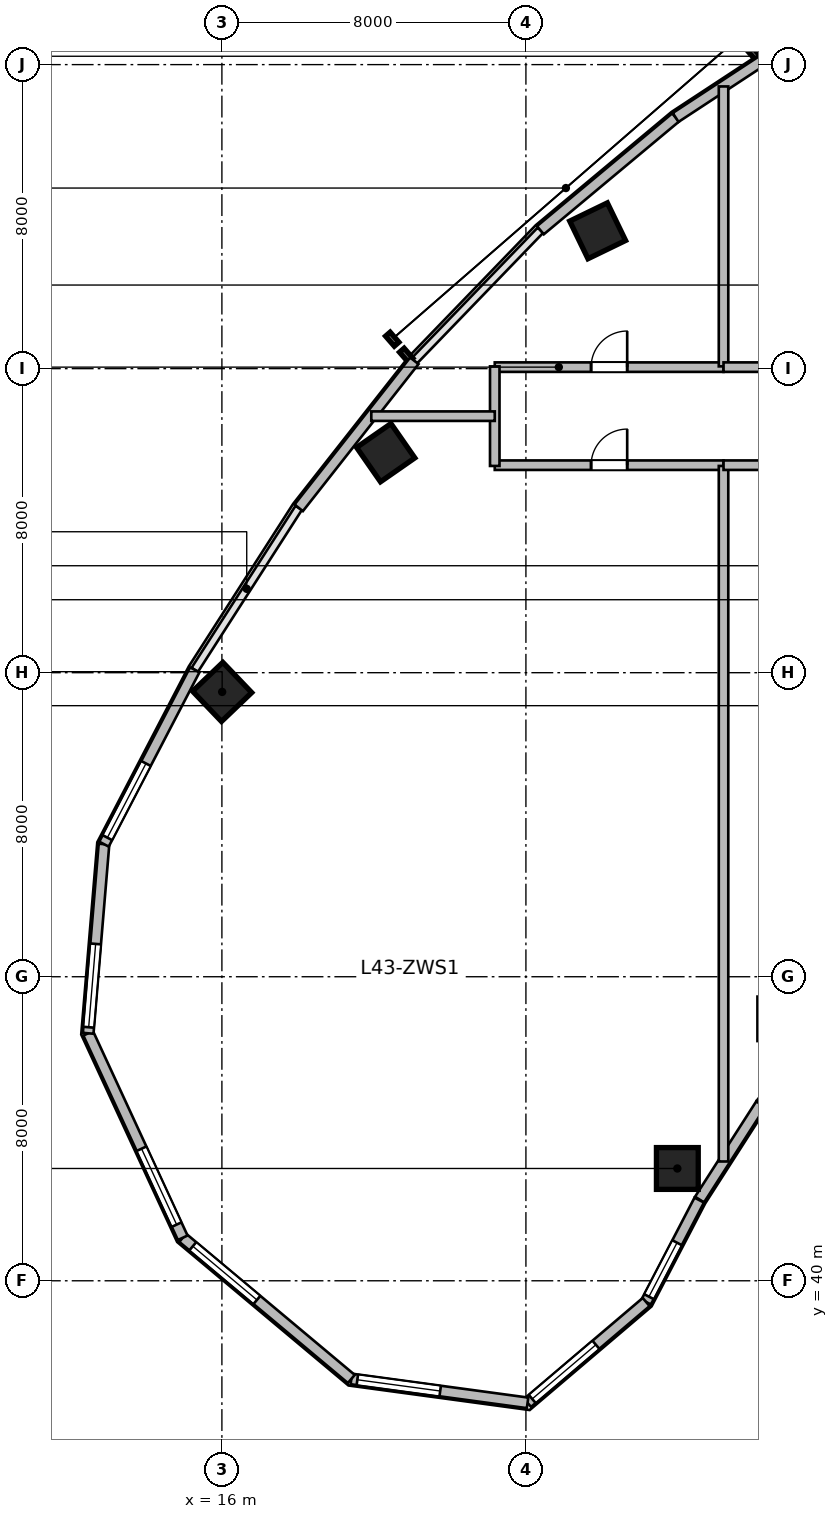
"""IFC4 building model, lengths in metres.
Left out: names, types, materials, properties, quantities, classifications, styles, units other than length and angle.
Written with IfcOpenShell. Run it as: python <this file> out.ifc"""

import sys

from ifc_helpers import new_model, si_unit, direction, frame, frame_2d, origin, origin_2d, place, context, subcontext, project, spatial, rectangle, circle, extrude, source, transform, mapped, element, fill, save


model = new_model("IFC4")
c1 = context("Model", 3, precision=1e-05, world=origin(), true_north=direction((0.0, 1.0)))
c2 = subcontext(c1, "Body", "Model", "MODEL_VIEW")
j1 = project(units=[si_unit("LENGTHUNIT", "METRE"), si_unit("PLANEANGLEUNIT", "RADIAN")], contexts=[c1])
p1 = place(None, origin())
s1 = spatial("IfcSite", under=j1, at=p1, CompositionType="ELEMENT")
p2 = place(p1, origin())
s2 = spatial("IfcBuilding", under=s1, at=p2, CompositionType="ELEMENT")
p3 = place(p2, frame((0.0, 0.0, 177.9)))
s3 = spatial("IfcBuildingStorey", under=s2, at=p3, CompositionType="ELEMENT", Elevation=177.9)
m1 = source(origin(), c2, "Body", "SweptSolid", [
    extrude(circle(Radius=0.55, at=origin_2d()), origin(), (0.0, 0.0, 1.0), 3.9),
])
p4 = place(p3, frame((27.985, 42.955, 0.0), z_axis=(0.0, 0.0, 1.0), x_axis=(-0.690756218984, 0.723087716626, 0.0)))
e1 = element("IfcColumn", 1, at=p4, inside=s3, PredefinedType="COLUMN", context=c2, shape_type="MappedRepresentation", body=[
    mapped(m1, transform((0.0, 0.0, 0.0), scale=1.0)),
])
m2 = source(origin(), c2, "Body", "SweptSolid", [
    extrude(rectangle(XDim=1.1, YDim=1.1, at=origin_2d()), origin(), (0.0, 0.0, 1.0), 3.9),
])
for number, where, z_axis, x_axis in (
    (2, (16.007, 55.494, 0.0), (0.0, 0.0, 1.0), (-0.691, 0.723, 0.0)),
    (3, (20.311, 61.789, 0.0), (0.0, 0.0, 1.0), (-0.571, 0.821, 0.0)),
    (4, (25.888, 67.627, 0.0), (0.0, 0.0, 1.0), (-0.436, 0.9, 0.0)),
):
    element("IfcColumn", number, at=place(p3, frame(where, z_axis=z_axis, x_axis=x_axis)), inside=s3, PredefinedType="COLUMN", context=c2, shape_type="MappedRepresentation", body=[
        mapped(m2, transform((0.0, 0.0, 0.0), scale=1.0)),
    ])
m3 = source(origin(), c2, "Body", "SweptSolid", [
    extrude(rectangle(XDim=2.897, YDim=0.28, at=frame_2d((1.448, 0.0))), origin(), (0.0, 0.0, 1.0), 3.65),
])
p5 = place(p3, frame((31.979, 46.936, 0.0), z_axis=(0.0, 0.0, 1.0), x_axis=(-0.618167636915, -0.786046291685, 0.0)))
e5 = element("IfcWall", 5, at=p5, inside=s3, PredefinedType="SOLIDWALL", context=c2, shape_type="MappedRepresentation", body=[
    mapped(m3, transform((0.0, 0.0, 0.0), scale=1.0)),
])
m4 = source(origin(), c2, "Body", "SweptSolid", [
    extrude(rectangle(XDim=2.981, YDim=0.28, at=frame_2d((1.49, 0.0))), origin(), (0.0, 0.0, 1.0), 3.65),
])
p6 = place(p3, frame((30.179, 44.645, 0.0), z_axis=(0.0, 0.0, 1.0), x_axis=(-0.540194451908, -0.841540227278, 0.0)))
e6 = element("IfcWall", 6, at=p6, inside=s3, PredefinedType="SOLIDWALL", context=c2, shape_type="MappedRepresentation", body=[
    mapped(m4, transform((0.0, 0.0, 0.0), scale=1.0)),
])
m5 = source(origin(), c2, "Body", "SweptSolid", [
    extrude(rectangle(XDim=3.024, YDim=0.28, at=frame_2d((1.512, 0.0))), origin(), (0.0, 0.0, 1.0), 3.65),
])
p7 = place(p3, frame((28.561, 42.123, 0.0), z_axis=(0.0, 0.0, 1.0), x_axis=(-0.461718746531, -0.887026380161, 0.0)))
e7 = element("IfcWall", 7, at=p7, inside=s3, PredefinedType="SOLIDWALL", context=c2, shape_type="MappedRepresentation", body=[
    mapped(m5, transform((0.0, 0.0, 0.0), scale=1.0)),
])
p8 = place(p7, frame((1.264, 0.0, 0.95)))
e8 = element("IfcOpeningElement", 8, at=p8, cuts=e7, PredefinedType="OPENING", context=c2, shape_type="SweptSolid", body=[
    extrude(rectangle(XDim=1.6, YDim=1.9, at=frame_2d((0.8, 0.95))), frame((0.0, 0.15, 0.0), z_axis=(0.0, -1.0, 0.0), x_axis=(1.0, 0.0, 0.0)), (0.0, 0.0, 1.0), 0.3),
])
m6 = source(origin(), c2, "Body", "SweptSolid", [
    extrude(rectangle(XDim=4.096, YDim=0.28, at=frame_2d((2.048, 0.0))), origin(), (0.0, 0.0, 1.0), 3.65),
])
p9 = place(p3, frame((27.164, 39.44, 0.0), z_axis=(0.0, 0.0, 1.0), x_axis=(-0.761926081737, -0.647663991564, 0.0)))
e9 = element("IfcWall", 9, at=p9, inside=s3, PredefinedType="SOLIDWALL", context=c2, shape_type="MappedRepresentation", body=[
    mapped(m6, transform((0.0, 0.0, 0.0), scale=1.0)),
])
p10 = place(p9, frame((1.736, 0.0, 0.95)))
e10 = element("IfcOpeningElement", 10, at=p10, cuts=e9, PredefinedType="OPENING", context=c2, shape_type="SweptSolid", body=[
    extrude(rectangle(XDim=2.2, YDim=2.1, at=frame_2d((1.1, 1.05))), frame((0.0, 0.15, 0.0), z_axis=(0.0, -1.0, 0.0), x_axis=(1.0, 0.0, 0.0)), (0.0, 0.0, 1.0), 0.3),
])
m7 = source(origin(), c2, "Body", "SweptSolid", [
    extrude(rectangle(XDim=4.68, YDim=0.28, at=frame_2d((2.34, 0.0))), origin(), (0.0, 0.0, 1.0), 3.65),
])
p11 = place(p3, frame((24.043, 36.788, 0.0), z_axis=(0.0, 0.0, 1.0), x_axis=(-0.990931146435, 0.134370618162, 0.0)))
e11 = element("IfcWall", 11, at=p11, inside=s3, PredefinedType="SOLIDWALL", context=c2, shape_type="MappedRepresentation", body=[
    mapped(m7, transform((0.0, 0.0, 0.0), scale=1.0)),
])
p12 = place(p11, frame((2.32, 0.0, 0.95)))
e12 = element("IfcOpeningElement", 12, at=p12, cuts=e11, PredefinedType="OPENING", context=c2, shape_type="SweptSolid", body=[
    extrude(rectangle(XDim=2.2, YDim=2.1, at=frame_2d((1.1, 1.05))), frame((0.0, 0.15, 0.0), z_axis=(0.0, -1.0, 0.0), x_axis=(1.0, 0.0, 0.0)), (0.0, 0.0, 1.0), 0.3),
])
m8 = source(origin(), c2, "Body", "SweptSolid", [
    extrude(rectangle(XDim=5.786, YDim=0.28, at=frame_2d((2.893, 0.0))), origin(), (0.0, 0.0, 1.0), 3.65),
])
p13 = place(p3, frame((19.406, 37.417, 0.0), z_axis=(0.0, 0.0, 1.0), x_axis=(-0.766711306852, 0.641992034176, 0.0)))
e13 = element("IfcWall", 13, at=p13, inside=s3, PredefinedType="SOLIDWALL", context=c2, shape_type="MappedRepresentation", body=[
    mapped(m8, transform((0.0, 0.0, 0.0), scale=1.0)),
])
p14 = place(p13, frame((3.24, 0.0, 0.95)))
e14 = element("IfcOpeningElement", 14, at=p14, cuts=e13, PredefinedType="OPENING", context=c2, shape_type="SweptSolid", body=[
    extrude(rectangle(XDim=2.2, YDim=2.1, at=frame_2d((1.1, 1.05))), frame((0.0, 0.15, 0.0), z_axis=(0.0, -1.0, 0.0), x_axis=(1.0, 0.0, 0.0)), (0.0, 0.0, 1.0), 0.3),
])
m9 = source(origin(), c2, "Body", "SweptSolid", [
    extrude(rectangle(XDim=5.927, YDim=0.28, at=frame_2d((2.964, 0.0))), origin(), (0.0, 0.0, 1.0), 3.65),
])
p15 = place(p3, frame((14.969, 41.131, 0.0), z_axis=(0.0, 0.0, 1.0), x_axis=(-0.419656204795, 0.907683132914, 0.0)))
e15 = element("IfcWall", 15, at=p15, inside=s3, PredefinedType="SOLIDWALL", context=c2, shape_type="MappedRepresentation", body=[
    mapped(m9, transform((0.0, 0.0, 0.0), scale=1.0)),
])
p16 = place(p15, frame((0.382, 0.0, 0.95)))
e16 = element("IfcOpeningElement", 16, at=p16, cuts=e15, PredefinedType="OPENING", context=c2, shape_type="SweptSolid", body=[
    extrude(rectangle(XDim=2.2, YDim=2.1, at=frame_2d((1.1, 1.05))), frame((0.0, 0.15, 0.0), z_axis=(0.0, -1.0, 0.0), x_axis=(1.0, 0.0, 0.0)), (0.0, 0.0, 1.0), 0.3),
])
m10 = source(origin(), c2, "Body", "SweptSolid", [
    extrude(rectangle(XDim=4.994, YDim=0.28, at=frame_2d((2.497, 0.0))), origin(), (0.0, 0.0, 1.0), 3.65),
])
p17 = place(p3, frame((12.481, 46.512, 0.0), z_axis=(0.0, 0.0, 1.0), x_axis=(0.083344839916, 0.996520766296, 0.0)))
e17 = element("IfcWall", 17, at=p17, inside=s3, PredefinedType="SOLIDWALL", context=c2, shape_type="MappedRepresentation", body=[
    mapped(m10, transform((0.0, 0.0, 0.0), scale=1.0)),
])
p18 = place(p17, frame((0.16, 0.0, 0.95)))
e18 = element("IfcOpeningElement", 18, at=p18, cuts=e17, PredefinedType="OPENING", context=c2, shape_type="SweptSolid", body=[
    extrude(rectangle(XDim=2.2, YDim=2.1, at=frame_2d((1.1, 1.05))), frame((0.0, 0.15, 0.0), z_axis=(0.0, -1.0, 0.0), x_axis=(1.0, 0.0, 0.0)), (0.0, 0.0, 1.0), 0.3),
])
m11 = source(origin(), c2, "Body", "SweptSolid", [
    extrude(rectangle(XDim=5.171, YDim=0.28, at=frame_2d((2.585, 0.0))), origin(), (0.0, 0.0, 1.0), 3.65),
])
p19 = place(p3, frame((12.898, 51.489, 0.0), z_axis=(0.0, 0.0, 1.0), x_axis=(0.461752581363, 0.887008767491, 0.0)))
e19 = element("IfcWall", 19, at=p19, inside=s3, PredefinedType="SOLIDWALL", context=c2, shape_type="MappedRepresentation", body=[
    mapped(m11, transform((0.0, 0.0, 0.0), scale=1.0)),
])
p20 = place(p19, frame((0.193, 0.0, 0.95)))
e20 = element("IfcOpeningElement", 20, at=p20, cuts=e19, PredefinedType="OPENING", context=c2, shape_type="SweptSolid", body=[
    extrude(rectangle(XDim=2.2, YDim=2.1, at=frame_2d((1.1, 1.05))), frame((0.0, 0.15, 0.0), z_axis=(0.0, -1.0, 0.0), x_axis=(1.0, 0.0, 0.0)), (0.0, 0.0, 1.0), 0.3),
])
m12 = source(origin(), c2, "Body", "SweptSolid", [
    extrude(rectangle(XDim=4.922, YDim=0.28, at=frame_2d((2.461, 0.0))), origin(), (0.0, 0.0, 1.0), 3.65),
])
p21 = place(p3, frame((18.021, 60.338, 0.0), z_axis=(0.0, 0.0, 1.0), x_axis=(0.61817639101, 0.786039407153, 0.0)))
e21 = element("IfcWall", 21, at=p21, inside=s3, PredefinedType="SOLIDWALL", context=c2, shape_type="MappedRepresentation", body=[
    mapped(m12, transform((0.0, 0.0, 0.0), scale=1.0)),
])
m13 = source(origin(), c2, "Body", "SweptSolid", [
    extrude(rectangle(XDim=4.634, YDim=0.28, at=frame_2d((2.317, 0.0))), origin(), (0.0, 0.0, 1.0), 3.65),
])
p22 = place(p3, frame((24.381, 67.642, 0.0), z_axis=(0.0, 0.0, 1.0), x_axis=(0.767910229096, 0.640557475993, 0.0)))
e22 = element("IfcWall", 22, at=p22, inside=s3, PredefinedType="SOLIDWALL", context=c2, shape_type="MappedRepresentation", body=[
    mapped(m13, transform((0.0, 0.0, 0.0), scale=1.0)),
])
m14 = source(origin(), c2, "Body", "SweptSolid", [
    extrude(rectangle(XDim=4.501, YDim=0.28, at=frame_2d((2.25, 0.0))), origin(), (0.0, 0.0, 1.0), 3.65),
])
p23 = place(p3, frame((27.939, 70.61, 0.0), z_axis=(0.0, 0.0, 1.0), x_axis=(0.835984920737, 0.548752414391, 0.0)))
e23 = element("IfcWall", 23, at=p23, inside=s3, PredefinedType="SOLIDWALL", context=c2, shape_type="MappedRepresentation", body=[
    mapped(m14, transform((0.0, 0.0, 0.0), scale=1.0)),
])
m15 = source(origin(), c2, "Body", "SweptSolid", [
    extrude(rectangle(XDim=6.02, YDim=0.25, at=frame_2d((3.01, 0.0))), origin(), (0.0, 0.0, 1.0), 3.65),
])
p24 = place(p3, frame((23.18, 64.04, 0.0), z_axis=(0.0, 0.0, 1.0), x_axis=(1.0, 0.0, 0.0)))
e24 = element("IfcWall", 24, at=p24, inside=s3, PredefinedType="PARTITIONING", context=c2, shape_type="MappedRepresentation", body=[
    mapped(m15, transform((0.0, 0.0, 0.0), scale=1.0)),
])
p25 = place(p24, frame((2.535, 0.0, 0.0)))
e25 = element("IfcOpeningElement", 25, at=p25, cuts=e24, PredefinedType="OPENING", context=c2, shape_type="SweptSolid", body=[
    extrude(rectangle(XDim=0.95, YDim=2.1, at=frame_2d((0.475, 1.05))), frame((0.0, 0.135, 0.0), z_axis=(0.0, -1.0, 0.0), x_axis=(1.0, 0.0, 0.0)), (0.0, 0.0, 1.0), 0.27),
])
m16 = source(origin(), c2, "Body", "SweptSolid", [
    extrude(rectangle(XDim=7.365, YDim=0.25, at=frame_2d((3.683, 0.0))), origin(), (0.0, 0.0, 1.0), 3.65),
])
p26 = place(p3, frame((29.2, 64.06, 0.0), z_axis=(0.0, 0.0, 1.0), x_axis=(0.0, 1.0, 0.0)))
e26 = element("IfcWall", 26, at=p26, inside=s3, PredefinedType="PARTITIONING", context=c2, shape_type="MappedRepresentation", body=[
    mapped(m16, transform((0.0, 0.0, 0.0), scale=1.0)),
])
m17 = source(origin(), c2, "Body", "SweptSolid", [
    extrude(rectangle(XDim=5.2, YDim=0.25, at=frame_2d((2.6, 0.0))), origin(), (0.0, 0.0, 1.0), 3.65),
])
p27 = place(p3, frame((29.2, 64.04, 0.0), z_axis=(0.0, 0.0, 1.0), x_axis=(1.0, 0.0, 0.0)))
e27 = element("IfcWall", 27, at=p27, inside=s3, PredefinedType="PARTITIONING", context=c2, shape_type="MappedRepresentation", body=[
    mapped(m17, transform((0.0, 0.0, 0.0), scale=1.0)),
])
p28 = place(p27, frame((2.125, 0.0, 0.0)))
e28 = element("IfcOpeningElement", 28, at=p28, cuts=e27, PredefinedType="OPENING", context=c2, shape_type="SweptSolid", body=[
    extrude(rectangle(XDim=0.95, YDim=2.1, at=frame_2d((0.475, 1.05))), frame((0.0, 0.135, 0.0), z_axis=(0.0, -1.0, 0.0), x_axis=(1.0, 0.0, 0.0)), (0.0, 0.0, 1.0), 0.27),
])
p29 = place(p3, frame((23.18, 61.46, 0.0), z_axis=(0.0, 0.0, 1.0), x_axis=(1.0, 0.0, 0.0)))
e29 = element("IfcWall", 29, at=p29, inside=s3, PredefinedType="PARTITIONING", context=c2, shape_type="MappedRepresentation", body=[
    mapped(m15, transform((0.0, 0.0, 0.0), scale=1.0)),
])
p30 = place(p29, frame((2.535, 0.0, 0.0)))
e30 = element("IfcOpeningElement", 30, at=p30, cuts=e29, PredefinedType="OPENING", context=c2, shape_type="SweptSolid", body=[
    extrude(rectangle(XDim=0.95, YDim=2.1, at=frame_2d((0.475, 1.05))), frame((0.0, 0.135, 0.0), z_axis=(0.0, -1.0, 0.0), x_axis=(1.0, 0.0, 0.0)), (0.0, 0.0, 1.0), 0.27),
])
m18 = source(origin(), c2, "Body", "SweptSolid", [
    extrude(rectangle(XDim=18.301, YDim=0.25, at=frame_2d((9.15, 0.0))), origin(), (0.0, 0.0, 1.0), 2.942),
])
p31 = place(p3, frame((29.2, 43.139, 0.0), z_axis=(0.0, 0.0, 1.0), x_axis=(0.0, 1.0, 0.0)))
e31 = element("IfcWall", 31, at=p31, inside=s3, PredefinedType="PARTITIONING", context=c2, shape_type="MappedRepresentation", body=[
    mapped(m18, transform((0.0, 0.0, 0.0), scale=1.0)),
])
p32 = place(p3, frame((29.2, 61.46, 0.0), z_axis=(0.0, 0.0, 1.0), x_axis=(1.0, 0.0, 0.0)))
e32 = element("IfcWall", 32, at=p32, inside=s3, PredefinedType="PARTITIONING", context=c2, shape_type="MappedRepresentation", body=[
    mapped(m17, transform((0.0, 0.0, 0.0), scale=1.0)),
])
p33 = place(p32, frame((2.125, 0.0, 0.0)))
e33 = element("IfcOpeningElement", 33, at=p33, cuts=e32, PredefinedType="OPENING", context=c2, shape_type="SweptSolid", body=[
    extrude(rectangle(XDim=0.95, YDim=2.1, at=frame_2d((0.475, 1.05))), frame((0.0, 0.135, 0.0), z_axis=(0.0, -1.0, 0.0), x_axis=(1.0, 0.0, 0.0)), (0.0, 0.0, 1.0), 0.27),
])
m19 = source(origin(), c2, "Body", "SweptSolid", [
    extrude(rectangle(XDim=2.62, YDim=0.25, at=frame_2d((1.31, 0.0))), origin(), (0.0, 0.0, 1.0), 3.65),
])
p34 = place(p3, frame((23.18, 61.44, 0.0), z_axis=(0.0, 0.0, 1.0), x_axis=(0.0, 1.0, 0.0)))
e34 = element("IfcWall", 34, at=p34, inside=s3, PredefinedType="PARTITIONING", context=c2, shape_type="MappedRepresentation", body=[
    mapped(m19, transform((0.0, 0.0, 0.0), scale=1.0)),
])
m20 = source(origin(), c2, "Body", "SweptSolid", [
    extrude(rectangle(XDim=3.249, YDim=0.25, at=frame_2d((1.625, 0.0))), origin(), (0.0, 0.0, 1.0), 3.65),
])
p35 = place(p3, frame((19.931, 62.75, 0.0), z_axis=(0.0, 0.0, 1.0), x_axis=(1.0, 0.0, 0.0)))
e35 = element("IfcWall", 35, at=p35, inside=s3, PredefinedType="PARTITIONING", context=c2, shape_type="MappedRepresentation", body=[
    mapped(m20, transform((0.0, 0.0, 0.0), scale=1.0)),
])
m21 = source(origin(), c2, "Body", "SweptSolid", [
    extrude(rectangle(XDim=1.6, YDim=1.9, at=frame_2d((0.8, 0.95))), frame((0.0, 0.03, 0.0), z_axis=(0.0, -1.0, 0.0), x_axis=(1.0, 0.0, 0.0)), (0.0, 0.0, 1.0), 0.06),
])
p36 = place(p8, origin())
e36 = element("IfcWindow", 36, at=p36, inside=s3, PartitioningType="SINGLE_PANEL", PredefinedType="WINDOW", context=c2, shape_type="MappedRepresentation", body=[
    mapped(m21, transform((0.0, 0.0, 0.0), scale=1.0)),
])
fill(e8, e36)
m22 = source(origin(), c2, "Body", "SweptSolid", [
    extrude(rectangle(XDim=2.2, YDim=2.1, at=frame_2d((1.1, 1.05))), frame((0.0, 0.03, 0.0), z_axis=(0.0, -1.0, 0.0), x_axis=(1.0, 0.0, 0.0)), (0.0, 0.0, 1.0), 0.06),
])
p37 = place(p10, origin())
e37 = element("IfcWindow", 37, at=p37, inside=s3, PartitioningType="TRIPLE_PANEL_VERTICAL", PredefinedType="WINDOW", context=c2, shape_type="MappedRepresentation", body=[
    mapped(m22, transform((0.0, 0.0, 0.0), scale=1.0)),
])
fill(e10, e37)
p38 = place(p12, origin())
e38 = element("IfcWindow", 38, at=p38, inside=s3, PartitioningType="TRIPLE_PANEL_VERTICAL", PredefinedType="WINDOW", context=c2, shape_type="MappedRepresentation", body=[
    mapped(m22, transform((0.0, 0.0, 0.0), scale=1.0)),
])
fill(e12, e38)
p39 = place(p14, origin())
e39 = element("IfcWindow", 39, at=p39, inside=s3, PartitioningType="TRIPLE_PANEL_VERTICAL", PredefinedType="WINDOW", context=c2, shape_type="MappedRepresentation", body=[
    mapped(m22, transform((0.0, 0.0, 0.0), scale=1.0)),
])
fill(e14, e39)
p40 = place(p16, origin())
e40 = element("IfcWindow", 40, at=p40, inside=s3, PartitioningType="TRIPLE_PANEL_VERTICAL", PredefinedType="WINDOW", context=c2, shape_type="MappedRepresentation", body=[
    mapped(m22, transform((0.0, 0.0, 0.0), scale=1.0)),
])
fill(e16, e40)
p41 = place(p18, origin())
e41 = element("IfcWindow", 41, at=p41, inside=s3, PartitioningType="TRIPLE_PANEL_VERTICAL", PredefinedType="WINDOW", context=c2, shape_type="MappedRepresentation", body=[
    mapped(m22, transform((0.0, 0.0, 0.0), scale=1.0)),
])
fill(e18, e41)
p42 = place(p20, origin())
e42 = element("IfcWindow", 42, at=p42, inside=s3, PartitioningType="TRIPLE_PANEL_VERTICAL", PredefinedType="WINDOW", context=c2, shape_type="MappedRepresentation", body=[
    mapped(m22, transform((0.0, 0.0, 0.0), scale=1.0)),
])
fill(e20, e42)
m23 = source(origin(), c2, "Body", "SweptSolid", [
    extrude(rectangle(XDim=0.95, YDim=2.1, at=frame_2d((0.475, 1.05))), frame((0.0, 0.025, 0.0), z_axis=(0.0, -1.0, 0.0), x_axis=(1.0, 0.0, 0.0)), (0.0, 0.0, 1.0), 0.05),
])
p43 = place(p25, origin())
e43 = element("IfcDoor", 43, at=p43, inside=s3, OperationType="SINGLE_SWING_RIGHT", PredefinedType="DOOR", context=c2, shape_type="MappedRepresentation", body=[
    mapped(m23, transform((0.0, 0.0, 0.0), scale=1.0)),
])
fill(e25, e43)
p44 = place(p30, origin())
e44 = element("IfcDoor", 44, at=p44, inside=s3, OperationType="SINGLE_SWING_RIGHT", PredefinedType="DOOR", context=c2, shape_type="MappedRepresentation", body=[
    mapped(m23, transform((0.0, 0.0, 0.0), scale=1.0)),
])
fill(e30, e44)
save(model, sys.argv[1])
